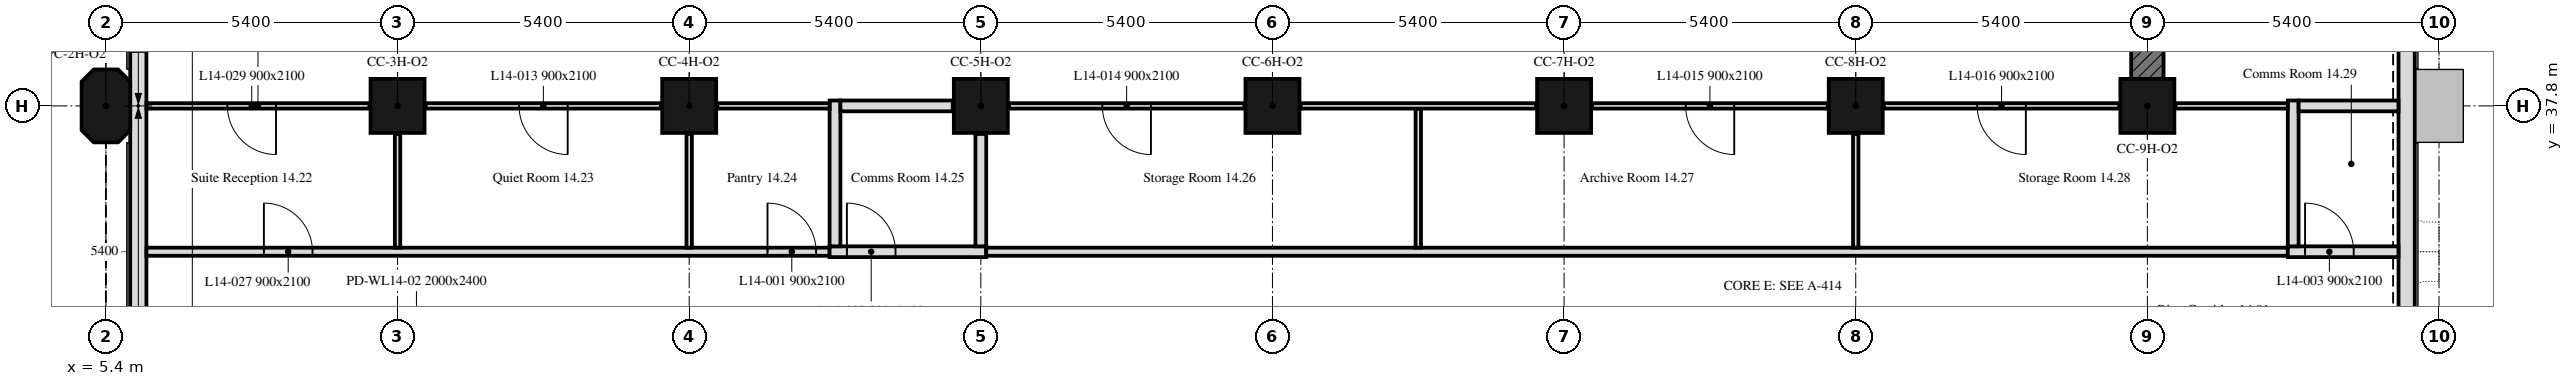
"""IFC4 building model, lengths in metres.
Left out: names, types, materials, properties, quantities, classifications, styles, units other than length and angle.
Written with IfcOpenShell. Run it as: python <this file> out.ifc"""

import sys

from ifc_helpers import new_model, si_unit, direction, frame, frame_2d, origin, origin_2d, place, context, subcontext, project, spatial, polyline, rectangle, outline, extrude, element, fill, save


model = new_model("IFC4")
c1 = context("Model", 3, precision=1e-05, world=origin(), true_north=direction((0.0, 1.0)))
c2 = subcontext(c1, "Body", "Model", "MODEL_VIEW")
j1 = project(units=[si_unit("LENGTHUNIT", "METRE"), si_unit("PLANEANGLEUNIT", "RADIAN")], contexts=[c1])
p1 = place(None, origin())
s1 = spatial("IfcSite", under=j1, at=p1, CompositionType="ELEMENT")
p2 = place(p1, origin())
s2 = spatial("IfcBuilding", under=s1, at=p2, CompositionType="ELEMENT")
p3 = place(p2, frame((0.0, 0.0, 65.0)))
s3 = spatial("IfcBuildingStorey", under=s2, at=p3, CompositionType="ELEMENT", Elevation=65.0)
p4 = place(p3, frame((5.4, 37.8, 0.0), z_axis=(0.0, 0.0, 1.0), x_axis=(0.0, 1.0, 0.0)))
e1 = element("IfcColumn", 1, at=p4, inside=s3, PredefinedType="COLUMN", context=c2, shape_type="SweptSolid", body=[
    extrude(outline(polyline([(-0.45, -0.45), (0.45, -0.45), (0.675, -0.225), (0.675, 0.225), (0.45, 0.45), (-0.45, 0.45), (-0.675, 0.225), (-0.675, -0.225), (-0.45, -0.45)])), origin(), (0.0, 0.0, 1.0), 3.5),
])
for number, where, z_axis, x_axis in (
    (2, (10.8, 37.8, 0.0), (0.0, 0.0, 1.0), (1.0, 0.0, 0.0)),
    (3, (16.2, 37.8, 0.0), (0.0, 0.0, 1.0), (1.0, 0.0, 0.0)),
    (4, (21.6, 37.8, 0.0), (0.0, 0.0, 1.0), (1.0, 0.0, 0.0)),
    (5, (27.0, 37.8, 0.0), (0.0, 0.0, 1.0), (1.0, 0.0, 0.0)),
    (6, (32.4, 37.8, 0.0), (0.0, 0.0, 1.0), (1.0, 0.0, 0.0)),
    (7, (37.8, 37.8, 0.0), (0.0, 0.0, 1.0), (1.0, 0.0, 0.0)),
    (8, (43.2, 37.8, 0.0), (0.0, 0.0, 1.0), (1.0, 0.0, 0.0)),
):
    element("IfcColumn", number, at=place(p3, frame(where, z_axis=z_axis, x_axis=x_axis)), inside=s3, PredefinedType="COLUMN", context=c2, shape_type="SweptSolid", body=[
        extrude(rectangle(XDim=1.0, YDim=1.0, at=origin_2d()), origin(), (0.0, 0.0, 1.0), 3.5),
    ])
p5 = place(p3, frame((43.2, 38.3, 0.0), z_axis=(0.0, 0.0, 1.0), x_axis=(0.0, 1.0, 0.0)))
e9 = element("IfcWall", 9, at=p5, inside=s3, PredefinedType="SHEAR", context=c2, shape_type="SweptSolid", body=[
    extrude(rectangle(XDim=1.7, YDim=0.6, at=frame_2d((0.85, 0.0))), origin(), (0.0, 0.0, 1.0), 3.5),
])
p6 = place(p3, frame((48.0, 10.986, 0.0), z_axis=(0.0, 0.0, 1.0), x_axis=(0.0, 1.0, 0.0)))
e10 = element("IfcWall", 10, at=p6, inside=s3, PredefinedType="SOLIDWALL", context=c2, shape_type="SweptSolid", body=[
    extrude(rectangle(XDim=32.027, YDim=0.3, at=frame_2d((16.014, 0.0))), origin(), (0.0, 0.0, 1.0), 3.5),
])
p7 = place(p6, frame((1.164, 0.0, 0.9)))
e11 = element("IfcOpeningElement", 11, at=p7, cuts=e10, PredefinedType="OPENING", context=c2, shape_type="SweptSolid", body=[
    extrude(rectangle(XDim=1.1, YDim=1.7, at=frame_2d((0.55, 0.85))), frame((0.0, 0.16, 0.0), z_axis=(0.0, -1.0, 0.0), x_axis=(1.0, 0.0, 0.0)), (0.0, 0.0, 1.0), 0.32),
])
p8 = place(p6, frame((2.764, 0.0, 0.9)))
e12 = element("IfcOpeningElement", 12, at=p8, cuts=e10, PredefinedType="OPENING", context=c2, shape_type="SweptSolid", body=[
    extrude(rectangle(XDim=1.1, YDim=1.7, at=frame_2d((0.55, 0.85))), frame((0.0, 0.16, 0.0), z_axis=(0.0, -1.0, 0.0), x_axis=(1.0, 0.0, 0.0)), (0.0, 0.0, 1.0), 0.32),
])
p9 = place(p3, frame((6.0, 43.014, 0.0), z_axis=(0.0, 0.0, 1.0), x_axis=(0.0, -1.0, 0.0)))
e13 = element("IfcWall", 13, at=p9, inside=s3, PredefinedType="SOLIDWALL", context=c2, shape_type="SweptSolid", body=[
    extrude(rectangle(XDim=10.614, YDim=0.3, at=frame_2d((5.307, 0.0))), origin(), (0.0, 0.0, 1.0), 3.5),
])
p10 = place(p9, frame((0.814, 0.0, 0.9)))
e14 = element("IfcOpeningElement", 14, at=p10, cuts=e13, PredefinedType="OPENING", context=c2, shape_type="SweptSolid", body=[
    extrude(rectangle(XDim=3.4, YDim=1.7, at=frame_2d((1.7, 0.85))), frame((0.0, 0.16, 0.0), z_axis=(0.0, -1.0, 0.0), x_axis=(1.0, 0.0, 0.0)), (0.0, 0.0, 1.0), 0.32),
])
p11 = place(p3, frame((6.151, 35.1, 0.0), z_axis=(0.0, 0.0, 1.0), x_axis=(1.0, 0.0, 0.0)))
e15 = element("IfcWall", 15, at=p11, inside=s3, PredefinedType="PARTITIONING", context=c2, shape_type="SweptSolid", body=[
    extrude(rectangle(XDim=12.649, YDim=0.15, at=frame_2d((6.325, 0.0))), origin(), (0.0, 0.0, 1.0), 2.75),
])
p12 = place(p11, frame((11.499, 0.0, 0.0)))
e16 = element("IfcOpeningElement", 16, at=p12, cuts=e15, PredefinedType="OPENING", context=c2, shape_type="SweptSolid", body=[
    extrude(rectangle(XDim=0.9, YDim=2.1, at=frame_2d((0.45, 1.05))), frame((0.0, 0.075, 0.0), z_axis=(0.0, -1.0, 0.0), x_axis=(1.0, 0.0, 0.0)), (0.0, 0.0, 1.0), 0.15),
])
p13 = place(p11, frame((2.174, 0.0, 0.0)))
e17 = element("IfcOpeningElement", 17, at=p13, cuts=e15, PredefinedType="OPENING", context=c2, shape_type="SweptSolid", body=[
    extrude(rectangle(XDim=0.9, YDim=2.1, at=frame_2d((0.45, 1.05))), frame((0.0, 0.075, 0.0), z_axis=(0.0, -1.0, 0.0), x_axis=(1.0, 0.0, 0.0)), (0.0, 0.0, 1.0), 0.15),
])
p14 = place(p3, frame((18.8, 35.1, 0.0), z_axis=(0.0, 0.0, 1.0), x_axis=(1.0, 0.0, 0.0)))
e18 = element("IfcWall", 18, at=p14, inside=s3, PredefinedType="PARTITIONING", context=c2, shape_type="SweptSolid", body=[
    extrude(rectangle(XDim=2.9, YDim=0.2, at=frame_2d((1.45, 0.0))), origin(), (0.0, 0.0, 1.0), 2.75),
])
p15 = place(p14, frame((0.32, 0.0, 0.0)))
e19 = element("IfcOpeningElement", 19, at=p15, cuts=e18, PredefinedType="OPENING", context=c2, shape_type="SweptSolid", body=[
    extrude(rectangle(XDim=0.9, YDim=2.1, at=frame_2d((0.45, 1.05))), frame((0.0, 0.1, 0.0), z_axis=(0.0, -1.0, 0.0), x_axis=(1.0, 0.0, 0.0)), (0.0, 0.0, 1.0), 0.2),
])
p16 = place(p3, frame((21.7, 35.1, 0.0), z_axis=(0.0, 0.0, 1.0), x_axis=(1.0, 0.0, 0.0)))
e20 = element("IfcWall", 20, at=p16, inside=s3, PredefinedType="PARTITIONING", context=c2, shape_type="SweptSolid", body=[
    extrude(rectangle(XDim=24.1, YDim=0.15, at=frame_2d((12.05, 0.0))), origin(), (0.0, 0.0, 1.0), 2.75),
])
p17 = place(p3, frame((45.8, 35.1, 0.0), z_axis=(0.0, 0.0, 1.0), x_axis=(1.0, 0.0, 0.0)))
e21 = element("IfcWall", 21, at=p17, inside=s3, PredefinedType="PARTITIONING", context=c2, shape_type="SweptSolid", body=[
    extrude(rectangle(XDim=2.049, YDim=0.2, at=frame_2d((1.024, 0.0))), origin(), (0.0, 0.0, 1.0), 3.5),
])
p18 = place(p17, frame((0.32, 0.0, 0.0)))
e22 = element("IfcOpeningElement", 22, at=p18, cuts=e21, PredefinedType="OPENING", context=c2, shape_type="SweptSolid", body=[
    extrude(rectangle(XDim=0.9, YDim=2.1, at=frame_2d((0.45, 1.05))), frame((0.0, 0.1, 0.0), z_axis=(0.0, -1.0, 0.0), x_axis=(1.0, 0.0, 0.0)), (0.0, 0.0, 1.0), 0.2),
])
p19 = place(p3, frame((10.28, 37.8, 0.0), z_axis=(0.0, 0.0, 1.0), x_axis=(-1.0, 0.0, 0.0)))
e23 = element("IfcWall", 23, at=p19, inside=s3, PredefinedType="PARTITIONING", context=c2, shape_type="SweptSolid", body=[
    extrude(rectangle(XDim=4.129, YDim=0.1, at=frame_2d((2.064, 0.0))), origin(), (0.0, 0.0, 1.0), 3.5),
])
p20 = place(p19, frame((1.73, 0.0, 0.0)))
e24 = element("IfcOpeningElement", 24, at=p20, cuts=e23, PredefinedType="OPENING", context=c2, shape_type="SweptSolid", body=[
    extrude(rectangle(XDim=0.9, YDim=2.1, at=frame_2d((0.45, 1.05))), frame((0.0, 0.05, 0.0), z_axis=(0.0, -1.0, 0.0), x_axis=(1.0, 0.0, 0.0)), (0.0, 0.0, 1.0), 0.1),
])
p21 = place(p3, frame((10.8, 35.175, 0.0), z_axis=(0.0, 0.0, 1.0), x_axis=(0.0, 1.0, 0.0)))
e25 = element("IfcWall", 25, at=p21, inside=s3, PredefinedType="PARTITIONING", context=c2, shape_type="SweptSolid", body=[
    extrude(rectangle(XDim=2.105, YDim=0.1, at=frame_2d((1.052, 0.0))), origin(), (0.0, 0.0, 1.0), 3.5),
])
p22 = place(p3, frame((16.2, 35.175, 0.0), z_axis=(0.0, 0.0, 1.0), x_axis=(0.0, 1.0, 0.0)))
e26 = element("IfcWall", 26, at=p22, inside=s3, PredefinedType="PARTITIONING", context=c2, shape_type="SweptSolid", body=[
    extrude(rectangle(XDim=2.105, YDim=0.1, at=frame_2d((1.052, 0.0))), origin(), (0.0, 0.0, 1.0), 2.75),
])
p23 = place(p3, frame((15.68, 37.8, 0.0), z_axis=(0.0, 0.0, 1.0), x_axis=(-1.0, 0.0, 0.0)))
e27 = element("IfcWall", 27, at=p23, inside=s3, PredefinedType="PARTITIONING", context=c2, shape_type="SweptSolid", body=[
    extrude(rectangle(XDim=4.36, YDim=0.1, at=frame_2d((2.18, 0.0))), origin(), (0.0, 0.0, 1.0), 3.5),
])
p24 = place(p23, frame((1.73, 0.0, 0.0)))
e28 = element("IfcOpeningElement", 28, at=p24, cuts=e27, PredefinedType="OPENING", context=c2, shape_type="SweptSolid", body=[
    extrude(rectangle(XDim=0.9, YDim=2.1, at=frame_2d((0.45, 1.05))), frame((0.0, 0.05, 0.0), z_axis=(0.0, -1.0, 0.0), x_axis=(1.0, 0.0, 0.0)), (0.0, 0.0, 1.0), 0.1),
])
p25 = place(p3, frame((18.9, 35.2, 0.0), z_axis=(0.0, 0.0, 1.0), x_axis=(0.0, 1.0, 0.0)))
e29 = element("IfcWall", 29, at=p25, inside=s3, PredefinedType="PARTITIONING", context=c2, shape_type="SweptSolid", body=[
    extrude(rectangle(XDim=2.7, YDim=0.2, at=frame_2d((1.35, 0.0))), origin(), (0.0, 0.0, 1.0), 3.5),
])
p26 = place(p3, frame((18.8, 37.8, 0.0), z_axis=(0.0, 0.0, 1.0), x_axis=(-1.0, 0.0, 0.0)))
e30 = element("IfcWall", 30, at=p26, inside=s3, PredefinedType="PARTITIONING", context=c2, shape_type="SweptSolid", body=[
    extrude(rectangle(XDim=2.08, YDim=0.1, at=frame_2d((1.04, 0.0))), origin(), (0.0, 0.0, 1.0), 3.5),
])
p27 = place(p3, frame((21.6, 35.2, 0.0), z_axis=(0.0, 0.0, 1.0), x_axis=(0.0, 1.0, 0.0)))
e31 = element("IfcWall", 31, at=p27, inside=s3, PredefinedType="PARTITIONING", context=c2, shape_type="SweptSolid", body=[
    extrude(rectangle(XDim=2.08, YDim=0.2, at=frame_2d((1.04, 0.0))), origin(), (0.0, 0.0, 1.0), 2.75),
])
p28 = place(p3, frame((21.08, 37.8, 0.0), z_axis=(0.0, 0.0, 1.0), x_axis=(-1.0, 0.0, 0.0)))
e32 = element("IfcWall", 32, at=p28, inside=s3, PredefinedType="PARTITIONING", context=c2, shape_type="SweptSolid", body=[
    extrude(rectangle(XDim=2.08, YDim=0.2, at=frame_2d((1.04, 0.0))), origin(), (0.0, 0.0, 1.0), 3.5),
])
p29 = place(p3, frame((29.7, 35.175, 0.0), z_axis=(0.0, 0.0, 1.0), x_axis=(0.0, 1.0, 0.0)))
e33 = element("IfcWall", 33, at=p29, inside=s3, PredefinedType="PARTITIONING", context=c2, shape_type="SweptSolid", body=[
    extrude(rectangle(XDim=2.575, YDim=0.1, at=frame_2d((1.288, 0.0))), origin(), (0.0, 0.0, 1.0), 3.5),
])
p30 = place(p3, frame((26.48, 37.8, 0.0), z_axis=(0.0, 0.0, 1.0), x_axis=(-1.0, 0.0, 0.0)))
e34 = element("IfcWall", 34, at=p30, inside=s3, PredefinedType="PARTITIONING", context=c2, shape_type="SweptSolid", body=[
    extrude(rectangle(XDim=4.36, YDim=0.1, at=frame_2d((2.18, 0.0))), origin(), (0.0, 0.0, 1.0), 3.5),
])
p31 = place(p30, frame((1.73, 0.0, 0.0)))
e35 = element("IfcOpeningElement", 35, at=p31, cuts=e34, PredefinedType="OPENING", context=c2, shape_type="SweptSolid", body=[
    extrude(rectangle(XDim=0.9, YDim=2.1, at=frame_2d((0.45, 1.05))), frame((0.0, 0.05, 0.0), z_axis=(0.0, -1.0, 0.0), x_axis=(1.0, 0.0, 0.0)), (0.0, 0.0, 1.0), 0.1),
])
p32 = place(p3, frame((37.8, 35.175, 0.0), z_axis=(0.0, 0.0, 1.0), x_axis=(0.0, 1.0, 0.0)))
e36 = element("IfcWall", 36, at=p32, inside=s3, PredefinedType="PARTITIONING", context=c2, shape_type="SweptSolid", body=[
    extrude(rectangle(XDim=2.105, YDim=0.1, at=frame_2d((1.052, 0.0))), origin(), (0.0, 0.0, 1.0), 2.75),
])
p33 = place(p3, frame((37.28, 37.8, 0.0), z_axis=(0.0, 0.0, 1.0), x_axis=(-1.0, 0.0, 0.0)))
e37 = element("IfcWall", 37, at=p33, inside=s3, PredefinedType="PARTITIONING", context=c2, shape_type="SweptSolid", body=[
    extrude(rectangle(XDim=4.36, YDim=0.1, at=frame_2d((2.18, 0.0))), origin(), (0.0, 0.0, 1.0), 2.75),
])
p34 = place(p33, frame((1.73, 0.0, 0.0)))
e38 = element("IfcOpeningElement", 38, at=p34, cuts=e37, PredefinedType="OPENING", context=c2, shape_type="SweptSolid", body=[
    extrude(rectangle(XDim=0.9, YDim=2.1, at=frame_2d((0.45, 1.05))), frame((0.0, 0.05, 0.0), z_axis=(0.0, -1.0, 0.0), x_axis=(1.0, 0.0, 0.0)), (0.0, 0.0, 1.0), 0.1),
])
p35 = place(p3, frame((31.88, 37.8, 0.0), z_axis=(0.0, 0.0, 1.0), x_axis=(-1.0, 0.0, 0.0)))
e39 = element("IfcWall", 39, at=p35, inside=s3, PredefinedType="PARTITIONING", context=c2, shape_type="SweptSolid", body=[
    extrude(rectangle(XDim=4.36, YDim=0.1, at=frame_2d((2.18, 0.0))), origin(), (0.0, 0.0, 1.0), 3.5),
])
p36 = place(p3, frame((45.9, 35.2, 0.0), z_axis=(0.0, 0.0, 1.0), x_axis=(0.0, 1.0, 0.0)))
e40 = element("IfcWall", 40, at=p36, inside=s3, PredefinedType="PARTITIONING", context=c2, shape_type="SweptSolid", body=[
    extrude(rectangle(XDim=2.7, YDim=0.2, at=frame_2d((1.35, 0.0))), origin(), (0.0, 0.0, 1.0), 2.75),
])
p37 = place(p3, frame((45.8, 37.8, 0.0), z_axis=(0.0, 0.0, 1.0), x_axis=(-1.0, 0.0, 0.0)))
e41 = element("IfcWall", 41, at=p37, inside=s3, PredefinedType="PARTITIONING", context=c2, shape_type="SweptSolid", body=[
    extrude(rectangle(XDim=2.08, YDim=0.1, at=frame_2d((1.04, 0.0))), origin(), (0.0, 0.0, 1.0), 2.75),
])
p38 = place(p3, frame((42.68, 37.8, 0.0), z_axis=(0.0, 0.0, 1.0), x_axis=(-1.0, 0.0, 0.0)))
e42 = element("IfcWall", 42, at=p38, inside=s3, PredefinedType="PARTITIONING", context=c2, shape_type="SweptSolid", body=[
    extrude(rectangle(XDim=4.36, YDim=0.1, at=frame_2d((2.18, 0.0))), origin(), (0.0, 0.0, 1.0), 2.75),
])
p39 = place(p38, frame((1.73, 0.0, 0.0)))
e43 = element("IfcOpeningElement", 43, at=p39, cuts=e42, PredefinedType="OPENING", context=c2, shape_type="SweptSolid", body=[
    extrude(rectangle(XDim=0.9, YDim=2.1, at=frame_2d((0.45, 1.05))), frame((0.0, 0.05, 0.0), z_axis=(0.0, -1.0, 0.0), x_axis=(1.0, 0.0, 0.0)), (0.0, 0.0, 1.0), 0.1),
])
p40 = place(p3, frame((46.0, 37.8, 0.0), z_axis=(0.0, 0.0, 1.0), x_axis=(1.0, 0.0, 0.0)))
e44 = element("IfcWall", 44, at=p40, inside=s3, PredefinedType="PARTITIONING", context=c2, shape_type="SweptSolid", body=[
    extrude(rectangle(XDim=1.849, YDim=0.2, at=frame_2d((0.925, 0.0))), origin(), (0.0, 0.0, 1.0), 2.75),
])
p41 = place(p12, origin())
e45 = element("IfcDoor", 45, at=p41, inside=s3, OperationType="SINGLE_SWING_RIGHT", PredefinedType="DOOR", context=c2, shape_type="SweptSolid", body=[
    extrude(rectangle(XDim=0.9, YDim=2.1, at=frame_2d((0.45, 1.05))), frame((0.0, 0.025, 0.0), z_axis=(0.0, -1.0, 0.0), x_axis=(1.0, 0.0, 0.0)), (0.0, 0.0, 1.0), 0.05),
])
fill(e16, e45)
p42 = place(p15, origin())
e46 = element("IfcDoor", 46, at=p42, inside=s3, OperationType="SINGLE_SWING_RIGHT", PredefinedType="DOOR", context=c2, shape_type="SweptSolid", body=[
    extrude(rectangle(XDim=0.9, YDim=2.1, at=frame_2d((0.45, 1.05))), frame((0.0, 0.025, 0.0), z_axis=(0.0, -1.0, 0.0), x_axis=(1.0, 0.0, 0.0)), (0.0, 0.0, 1.0), 0.05),
])
fill(e19, e46)
p43 = place(p18, origin())
e47 = element("IfcDoor", 47, at=p43, inside=s3, OperationType="SINGLE_SWING_LEFT", PredefinedType="DOOR", context=c2, shape_type="SweptSolid", body=[
    extrude(rectangle(XDim=0.9, YDim=2.1, at=frame_2d((0.45, 1.05))), frame((0.0, 0.025, 0.0), z_axis=(0.0, -1.0, 0.0), x_axis=(1.0, 0.0, 0.0)), (0.0, 0.0, 1.0), 0.05),
])
fill(e22, e47)
p44 = place(p24, origin())
e48 = element("IfcDoor", 48, at=p44, inside=s3, OperationType="SINGLE_SWING_RIGHT", PredefinedType="DOOR", context=c2, shape_type="SweptSolid", body=[
    extrude(rectangle(XDim=0.9, YDim=2.1, at=frame_2d((0.45, 1.05))), frame((0.0, 0.025, 0.0), z_axis=(0.0, -1.0, 0.0), x_axis=(1.0, 0.0, 0.0)), (0.0, 0.0, 1.0), 0.05),
])
fill(e28, e48)
p45 = place(p31, origin())
e49 = element("IfcDoor", 49, at=p45, inside=s3, OperationType="SINGLE_SWING_RIGHT", PredefinedType="DOOR", context=c2, shape_type="SweptSolid", body=[
    extrude(rectangle(XDim=0.9, YDim=2.1, at=frame_2d((0.45, 1.05))), frame((0.0, 0.025, 0.0), z_axis=(0.0, -1.0, 0.0), x_axis=(1.0, 0.0, 0.0)), (0.0, 0.0, 1.0), 0.05),
])
fill(e35, e49)
p46 = place(p34, origin())
e50 = element("IfcDoor", 50, at=p46, inside=s3, OperationType="SINGLE_SWING_LEFT", PredefinedType="DOOR", context=c2, shape_type="SweptSolid", body=[
    extrude(rectangle(XDim=0.9, YDim=2.1, at=frame_2d((0.45, 1.05))), frame((0.0, 0.025, 0.0), z_axis=(0.0, -1.0, 0.0), x_axis=(1.0, 0.0, 0.0)), (0.0, 0.0, 1.0), 0.05),
])
fill(e38, e50)
p47 = place(p39, origin())
e51 = element("IfcDoor", 51, at=p47, inside=s3, OperationType="SINGLE_SWING_LEFT", PredefinedType="DOOR", context=c2, shape_type="SweptSolid", body=[
    extrude(rectangle(XDim=0.9, YDim=2.1, at=frame_2d((0.45, 1.05))), frame((0.0, 0.025, 0.0), z_axis=(0.0, -1.0, 0.0), x_axis=(1.0, 0.0, 0.0)), (0.0, 0.0, 1.0), 0.05),
])
fill(e43, e51)
p48 = place(p13, origin())
e52 = element("IfcDoor", 52, at=p48, inside=s3, OperationType="SINGLE_SWING_RIGHT", PredefinedType="DOOR", context=c2, shape_type="SweptSolid", body=[
    extrude(rectangle(XDim=0.9, YDim=2.1, at=frame_2d((0.45, 1.05))), frame((0.0, 0.025, 0.0), z_axis=(0.0, -1.0, 0.0), x_axis=(1.0, 0.0, 0.0)), (0.0, 0.0, 1.0), 0.05),
])
fill(e17, e52)
p49 = place(p20, origin())
e53 = element("IfcDoor", 53, at=p49, inside=s3, OperationType="SINGLE_SWING_LEFT", PredefinedType="DOOR", context=c2, shape_type="SweptSolid", body=[
    extrude(rectangle(XDim=0.9, YDim=2.1, at=frame_2d((0.45, 1.05))), frame((0.0, 0.025, 0.0), z_axis=(0.0, -1.0, 0.0), x_axis=(1.0, 0.0, 0.0)), (0.0, 0.0, 1.0), 0.05),
])
fill(e24, e53)
save(model, sys.argv[1])
